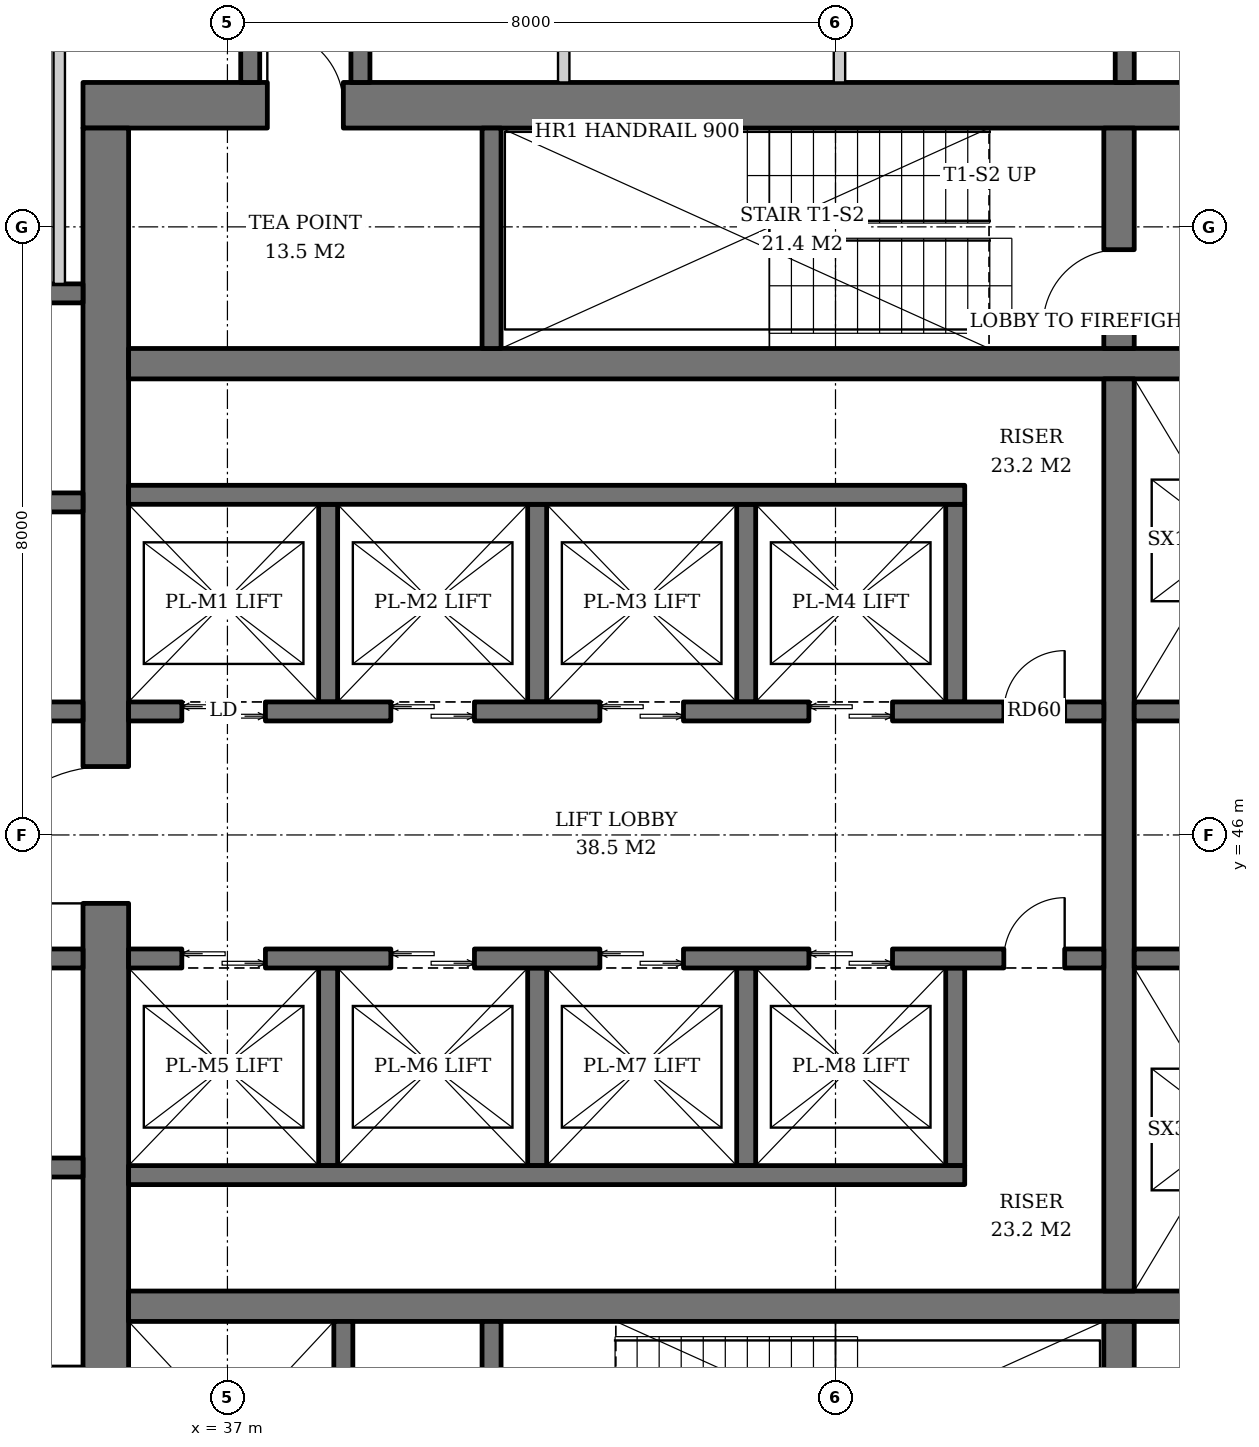
"""IFC4 building model, lengths in metres.
Left out: names, types, materials, properties, quantities, classifications, styles, units other than length and angle.
Written with IfcOpenShell. Run it as: python <this file> out.ifc"""

import sys

from ifc_helpers import new_model, si_unit, direction, frame, frame_2d, origin, place, context, subcontext, project, spatial, rectangle, extrude, element, fill, save


model = new_model("IFC4")
c1 = context("Model", 3, precision=1e-05, world=origin(), true_north=direction((0.0, 1.0)))
c2 = subcontext(c1, "Body", "Model", "MODEL_VIEW")
j1 = project(units=[si_unit("LENGTHUNIT", "METRE"), si_unit("PLANEANGLEUNIT", "RADIAN")], contexts=[c1])
p1 = place(None, origin())
s1 = spatial("IfcSite", under=j1, at=p1, CompositionType="ELEMENT")
p2 = place(p1, origin())
s2 = spatial("IfcBuilding", under=s1, at=p2, CompositionType="ELEMENT")
p3 = place(p2, frame((0.0, 0.0, 154.0)))
s3 = spatial("IfcBuildingStorey", under=s2, at=p3, CompositionType="ELEMENT", Elevation=154.0)
p4 = place(p3, frame((35.1, 55.6, 0.0), z_axis=(0.0, 0.0, 1.0), x_axis=(1.0, 0.0, 0.0)))
e1 = element("IfcWall", 1, at=p4, inside=s3, PredefinedType="SHEAR", context=c2, shape_type="SweptSolid", body=[
    extrude(rectangle(XDim=19.8, YDim=0.6, at=frame_2d((9.9, 0.0))), origin(), (0.0, 0.0, 1.0), 3.8),
])
p5 = place(p4, frame((14.54, 0.0, 0.0)))
e2 = element("IfcOpeningElement", 2, at=p5, cuts=e1, PredefinedType="OPENING", context=c2, shape_type="SweptSolid", body=[
    extrude(rectangle(XDim=1.0, YDim=2.1, at=frame_2d((0.5, 1.05))), frame((0.0, 0.31, 0.0), z_axis=(0.0, -1.0, 0.0), x_axis=(1.0, 0.0, 0.0)), (0.0, 0.0, 1.0), 0.62),
])
p6 = place(p4, frame((2.425, 0.0, 0.0)))
e3 = element("IfcOpeningElement", 3, at=p6, cuts=e1, PredefinedType="OPENING", context=c2, shape_type="SweptSolid", body=[
    extrude(rectangle(XDim=1.0, YDim=2.1, at=frame_2d((0.5, 1.05))), frame((0.0, 0.31, 0.0), z_axis=(0.0, -1.0, 0.0), x_axis=(1.0, 0.0, 0.0)), (0.0, 0.0, 1.0), 0.62),
])
p7 = place(p3, frame((35.4, 36.7, 0.0), z_axis=(0.0, 0.0, 1.0), x_axis=(0.0, 1.0, 0.0)))
e4 = element("IfcWall", 4, at=p7, inside=s3, PredefinedType="SHEAR", context=c2, shape_type="SweptSolid", body=[
    extrude(rectangle(XDim=18.6, YDim=0.6, at=frame_2d((9.3, 0.0))), origin(), (0.0, 0.0, 1.0), 3.8),
])
p8 = place(p7, frame((8.4, 0.0, 0.0)))
e5 = element("IfcOpeningElement", 5, at=p8, cuts=e4, PredefinedType="OPENING", context=c2, shape_type="SweptSolid", body=[
    extrude(rectangle(XDim=1.8, YDim=2.4, at=frame_2d((0.9, 1.2))), frame((0.0, 0.31, 0.0), z_axis=(0.0, -1.0, 0.0), x_axis=(1.0, 0.0, 0.0)), (0.0, 0.0, 1.0), 0.62),
])
for number, where, z_axis, x_axis in (
    (6, (35.7, 39.8, 0.0), (0.0, 0.0, 1.0), (1.0, 0.0, 0.0)),
    (7, (35.7, 52.2, 0.0), (0.0, 0.0, 1.0), (1.0, 0.0, 0.0)),
):
    element("IfcWall", number, at=place(p3, frame(where, z_axis=z_axis, x_axis=x_axis)), inside=s3, PredefinedType="SHEAR", context=c2, shape_type="SweptSolid", body=[
        extrude(rectangle(XDim=18.6, YDim=0.4, at=frame_2d((9.3, 0.0))), origin(), (0.0, 0.0, 1.0), 3.8),
    ])
p9 = place(p3, frame((48.73, 36.7, 0.0), z_axis=(0.0, 0.0, 1.0), x_axis=(0.0, 1.0, 0.0)))
e8 = element("IfcWall", 8, at=p9, inside=s3, PredefinedType="SHEAR", context=c2, shape_type="SweptSolid", body=[
    extrude(rectangle(XDim=2.9, YDim=0.4, at=frame_2d((1.45, 0.0))), origin(), (0.0, 0.0, 1.0), 3.8),
])
p10 = place(p3, frame((48.73, 40.0, 0.0), z_axis=(0.0, 0.0, 1.0), x_axis=(0.0, 1.0, 0.0)))
e9 = element("IfcWall", 9, at=p10, inside=s3, PredefinedType="SHEAR", context=c2, shape_type="SweptSolid", body=[
    extrude(rectangle(XDim=12.0, YDim=0.4, at=frame_2d((6.0, 0.0))), origin(), (0.0, 0.0, 1.0), 3.8),
])
p11 = place(p3, frame((48.73, 52.4, 0.0), z_axis=(0.0, 0.0, 1.0), x_axis=(0.0, 1.0, 0.0)))
e10 = element("IfcWall", 10, at=p11, inside=s3, PredefinedType="SHEAR", context=c2, shape_type="SweptSolid", body=[
    extrude(rectangle(XDim=2.9, YDim=0.4, at=frame_2d((1.45, 0.0))), origin(), (0.0, 0.0, 1.0), 3.8),
])
p12 = place(p11, frame((0.3, 0.0, 0.0)))
e11 = element("IfcOpeningElement", 11, at=p12, cuts=e10, PredefinedType="OPENING", context=c2, shape_type="SweptSolid", body=[
    extrude(rectangle(XDim=1.0, YDim=2.1, at=frame_2d((0.5, 1.05))), frame((0.0, 0.21, 0.0), z_axis=(0.0, -1.0, 0.0), x_axis=(1.0, 0.0, 0.0)), (0.0, 0.0, 1.0), 0.42),
])
p13 = place(p3, frame((38.525, 36.7, 0.0), z_axis=(0.0, 0.0, 1.0), x_axis=(0.0, 1.0, 0.0)))
e12 = element("IfcWall", 12, at=p13, inside=s3, PredefinedType="SHEAR", context=c2, shape_type="SweptSolid", body=[
    extrude(rectangle(XDim=2.9, YDim=0.25, at=frame_2d((1.45, 0.0))), origin(), (0.0, 0.0, 1.0), 3.8),
])
p14 = place(p13, frame((0.8, 0.0, 0.0)))
e13 = element("IfcOpeningElement", 13, at=p14, cuts=e12, PredefinedType="OPENING", context=c2, shape_type="SweptSolid", body=[
    extrude(rectangle(XDim=1.3, YDim=2.2, at=frame_2d((0.65, 1.1))), frame((0.0, 0.135, 0.0), z_axis=(0.0, -1.0, 0.0), x_axis=(1.0, 0.0, 0.0)), (0.0, 0.0, 1.0), 0.27),
])
p15 = place(p3, frame((40.475, 36.7, 0.0), z_axis=(0.0, 0.0, 1.0), x_axis=(0.0, 1.0, 0.0)))
e14 = element("IfcWall", 14, at=p15, inside=s3, PredefinedType="SHEAR", context=c2, shape_type="SweptSolid", body=[
    extrude(rectangle(XDim=2.9, YDim=0.25, at=frame_2d((1.45, 0.0))), origin(), (0.0, 0.0, 1.0), 3.8),
])
p16 = place(p15, frame((0.75, 0.0, 0.0)))
e15 = element("IfcOpeningElement", 15, at=p16, cuts=e14, PredefinedType="OPENING", context=c2, shape_type="SweptSolid", body=[
    extrude(rectangle(XDim=1.2, YDim=2.1, at=frame_2d((0.6, 1.05))), frame((0.0, 0.135, 0.0), z_axis=(0.0, -1.0, 0.0), x_axis=(1.0, 0.0, 0.0)), (0.0, 0.0, 1.0), 0.27),
])
p17 = place(p3, frame((40.475, 52.4, 0.0), z_axis=(0.0, 0.0, 1.0), x_axis=(0.0, 1.0, 0.0)))
e16 = element("IfcWall", 16, at=p17, inside=s3, PredefinedType="SHEAR", context=c2, shape_type="SweptSolid", body=[
    extrude(rectangle(XDim=2.9, YDim=0.25, at=frame_2d((1.45, 0.0))), origin(), (0.0, 0.0, 1.0), 3.8),
])
for number, where, z_axis, x_axis in (
    (17, (38.325, 47.75, 0.0), (0.0, 0.0, 1.0), (0.0, 1.0, 0.0)),
    (18, (41.075, 47.75, 0.0), (0.0, 0.0, 1.0), (0.0, 1.0, 0.0)),
    (19, (43.825, 47.75, 0.0), (0.0, 0.0, 1.0), (0.0, 1.0, 0.0)),
    (20, (46.575, 47.75, 0.0), (0.0, 0.0, 1.0), (0.0, 1.0, 0.0)),
):
    element("IfcWall", number, at=place(p3, frame(where, z_axis=z_axis, x_axis=x_axis)), inside=s3, PredefinedType="SHEAR", context=c2, shape_type="SweptSolid", body=[
        extrude(rectangle(XDim=2.6, YDim=0.25, at=frame_2d((1.3, 0.0))), origin(), (0.0, 0.0, 1.0), 3.8),
    ])
p18 = place(p3, frame((35.7, 50.475, 0.0), z_axis=(0.0, 0.0, 1.0), x_axis=(1.0, 0.0, 0.0)))
e21 = element("IfcWall", 21, at=p18, inside=s3, PredefinedType="SHEAR", context=c2, shape_type="SweptSolid", body=[
    extrude(rectangle(XDim=11.0, YDim=0.25, at=frame_2d((5.5, 0.0))), origin(), (0.0, 0.0, 1.0), 3.8),
])
p19 = place(p3, frame((35.7, 47.625, 0.0), z_axis=(0.0, 0.0, 1.0), x_axis=(1.0, 0.0, 0.0)))
e22 = element("IfcWall", 22, at=p19, inside=s3, PredefinedType="SHEAR", context=c2, shape_type="SweptSolid", body=[
    extrude(rectangle(XDim=12.83, YDim=0.25, at=frame_2d((6.415, 0.0))), origin(), (0.0, 0.0, 1.0), 3.8),
])
p20 = place(p19, frame((0.7, 0.0, 0.0)))
e23 = element("IfcOpeningElement", 23, at=p20, cuts=e22, PredefinedType="OPENING", context=c2, shape_type="SweptSolid", body=[
    extrude(rectangle(XDim=1.1, YDim=2.2, at=frame_2d((0.55, 1.1))), frame((0.0, 0.135, 0.0), z_axis=(0.0, -1.0, 0.0), x_axis=(1.0, 0.0, 0.0)), (0.0, 0.0, 1.0), 0.27),
])
p21 = place(p19, frame((3.45, 0.0, 0.0)))
e24 = element("IfcOpeningElement", 24, at=p21, cuts=e22, PredefinedType="OPENING", context=c2, shape_type="SweptSolid", body=[
    extrude(rectangle(XDim=1.1, YDim=2.2, at=frame_2d((0.55, 1.1))), frame((0.0, 0.135, 0.0), z_axis=(0.0, -1.0, 0.0), x_axis=(1.0, 0.0, 0.0)), (0.0, 0.0, 1.0), 0.27),
])
p22 = place(p19, frame((6.2, 0.0, 0.0)))
e25 = element("IfcOpeningElement", 25, at=p22, cuts=e22, PredefinedType="OPENING", context=c2, shape_type="SweptSolid", body=[
    extrude(rectangle(XDim=1.1, YDim=2.2, at=frame_2d((0.55, 1.1))), frame((0.0, 0.135, 0.0), z_axis=(0.0, -1.0, 0.0), x_axis=(1.0, 0.0, 0.0)), (0.0, 0.0, 1.0), 0.27),
])
p23 = place(p19, frame((8.95, 0.0, 0.0)))
e26 = element("IfcOpeningElement", 26, at=p23, cuts=e22, PredefinedType="OPENING", context=c2, shape_type="SweptSolid", body=[
    extrude(rectangle(XDim=1.1, YDim=2.2, at=frame_2d((0.55, 1.1))), frame((0.0, 0.135, 0.0), z_axis=(0.0, -1.0, 0.0), x_axis=(1.0, 0.0, 0.0)), (0.0, 0.0, 1.0), 0.27),
])
p24 = place(p19, frame((11.515, 0.0, 0.0)))
e27 = element("IfcOpeningElement", 27, at=p24, cuts=e22, PredefinedType="OPENING", context=c2, shape_type="SweptSolid", body=[
    extrude(rectangle(XDim=0.8, YDim=2.0, at=frame_2d((0.4, 1.0))), frame((0.0, 0.135, 0.0), z_axis=(0.0, -1.0, 0.0), x_axis=(1.0, 0.0, 0.0)), (0.0, 0.0, 1.0), 0.27),
])
for number, where, z_axis, x_axis in (
    (28, (38.325, 44.25, 0.0), (0.0, 0.0, 1.0), (0.0, -1.0, 0.0)),
    (29, (41.075, 44.25, 0.0), (0.0, 0.0, 1.0), (0.0, -1.0, 0.0)),
    (30, (43.825, 44.25, 0.0), (0.0, 0.0, 1.0), (0.0, -1.0, 0.0)),
    (31, (46.575, 44.25, 0.0), (0.0, 0.0, 1.0), (0.0, -1.0, 0.0)),
):
    element("IfcWall", number, at=place(p3, frame(where, z_axis=z_axis, x_axis=x_axis)), inside=s3, PredefinedType="SHEAR", context=c2, shape_type="SweptSolid", body=[
        extrude(rectangle(XDim=2.6, YDim=0.25, at=frame_2d((1.3, 0.0))), origin(), (0.0, 0.0, 1.0), 3.8),
    ])
p25 = place(p3, frame((35.7, 41.525, 0.0), z_axis=(0.0, 0.0, 1.0), x_axis=(1.0, 0.0, 0.0)))
e32 = element("IfcWall", 32, at=p25, inside=s3, PredefinedType="SHEAR", context=c2, shape_type="SweptSolid", body=[
    extrude(rectangle(XDim=11.0, YDim=0.25, at=frame_2d((5.5, 0.0))), origin(), (0.0, 0.0, 1.0), 3.8),
])
p26 = place(p3, frame((35.7, 44.375, 0.0), z_axis=(0.0, 0.0, 1.0), x_axis=(1.0, 0.0, 0.0)))
e33 = element("IfcWall", 33, at=p26, inside=s3, PredefinedType="SHEAR", context=c2, shape_type="SweptSolid", body=[
    extrude(rectangle(XDim=12.83, YDim=0.25, at=frame_2d((6.415, 0.0))), origin(), (0.0, 0.0, 1.0), 3.8),
])
p27 = place(p26, frame((0.7, 0.0, 0.0)))
e34 = element("IfcOpeningElement", 34, at=p27, cuts=e33, PredefinedType="OPENING", context=c2, shape_type="SweptSolid", body=[
    extrude(rectangle(XDim=1.1, YDim=2.2, at=frame_2d((0.55, 1.1))), frame((0.0, 0.135, 0.0), z_axis=(0.0, -1.0, 0.0), x_axis=(1.0, 0.0, 0.0)), (0.0, 0.0, 1.0), 0.27),
])
p28 = place(p26, frame((3.45, 0.0, 0.0)))
e35 = element("IfcOpeningElement", 35, at=p28, cuts=e33, PredefinedType="OPENING", context=c2, shape_type="SweptSolid", body=[
    extrude(rectangle(XDim=1.1, YDim=2.2, at=frame_2d((0.55, 1.1))), frame((0.0, 0.135, 0.0), z_axis=(0.0, -1.0, 0.0), x_axis=(1.0, 0.0, 0.0)), (0.0, 0.0, 1.0), 0.27),
])
p29 = place(p26, frame((6.2, 0.0, 0.0)))
e36 = element("IfcOpeningElement", 36, at=p29, cuts=e33, PredefinedType="OPENING", context=c2, shape_type="SweptSolid", body=[
    extrude(rectangle(XDim=1.1, YDim=2.2, at=frame_2d((0.55, 1.1))), frame((0.0, 0.135, 0.0), z_axis=(0.0, -1.0, 0.0), x_axis=(1.0, 0.0, 0.0)), (0.0, 0.0, 1.0), 0.27),
])
p30 = place(p26, frame((8.95, 0.0, 0.0)))
e37 = element("IfcOpeningElement", 37, at=p30, cuts=e33, PredefinedType="OPENING", context=c2, shape_type="SweptSolid", body=[
    extrude(rectangle(XDim=1.1, YDim=2.2, at=frame_2d((0.55, 1.1))), frame((0.0, 0.135, 0.0), z_axis=(0.0, -1.0, 0.0), x_axis=(1.0, 0.0, 0.0)), (0.0, 0.0, 1.0), 0.27),
])
p31 = place(p26, frame((11.515, 0.0, 0.0)))
e38 = element("IfcOpeningElement", 38, at=p31, cuts=e33, PredefinedType="OPENING", context=c2, shape_type="SweptSolid", body=[
    extrude(rectangle(XDim=0.8, YDim=2.0, at=frame_2d((0.4, 1.0))), frame((0.0, 0.135, 0.0), z_axis=(0.0, -1.0, 0.0), x_axis=(1.0, 0.0, 0.0)), (0.0, 0.0, 1.0), 0.27),
])
for number, where, z_axis, x_axis in (
    (39, (48.93, 47.625, 0.0), (0.0, 0.0, 1.0), (1.0, 0.0, 0.0)),
    (40, (48.93, 44.375, 0.0), (0.0, 0.0, 1.0), (1.0, 0.0, 0.0)),
):
    element("IfcWall", number, at=place(p3, frame(where, z_axis=z_axis, x_axis=x_axis)), inside=s3, PredefinedType="SHEAR", context=c2, shape_type="SweptSolid", body=[
        extrude(rectangle(XDim=5.37, YDim=0.25, at=frame_2d((2.685, 0.0))), origin(), (0.0, 0.0, 1.0), 3.8),
    ])
for number, where, z_axis, x_axis in (
    (41, (32.4, 41.625, 0.0), (0.0, 0.0, 1.0), (1.0, 0.0, 0.0)),
    (42, (32.4, 44.375, 0.0), (0.0, 0.0, 1.0), (1.0, 0.0, 0.0)),
    (43, (32.4, 47.625, 0.0), (0.0, 0.0, 1.0), (1.0, 0.0, 0.0)),
    (44, (32.4, 50.375, 0.0), (0.0, 0.0, 1.0), (1.0, 0.0, 0.0)),
    (45, (32.4, 53.125, 0.0), (0.0, 0.0, 1.0), (1.0, 0.0, 0.0)),
):
    element("IfcWall", number, at=place(p3, frame(where, z_axis=z_axis, x_axis=x_axis)), inside=s3, PredefinedType="SHEAR", context=c2, shape_type="SweptSolid", body=[
        extrude(rectangle(XDim=2.7, YDim=0.25, at=frame_2d((1.35, 0.0))), origin(), (0.0, 0.0, 1.0), 3.8),
    ])
for number, where, z_axis, x_axis in (
    (46, (48.805, 55.9, 0.0), (0.0, 0.0, 1.0), (0.0, 1.0, 0.0)),
    (47, (37.3, 55.9, 0.0), (0.0, 0.0, 1.0), (0.0, 1.0, 0.0)),
    (48, (38.75, 55.9, 0.0), (0.0, 0.0, 1.0), (0.0, 1.0, 0.0)),
):
    element("IfcWall", number, at=place(p3, frame(where, z_axis=z_axis, x_axis=x_axis)), inside=s3, PredefinedType="SOLIDWALL", context=c2, shape_type="SweptSolid", body=[
        extrude(rectangle(XDim=2.7, YDim=0.25, at=frame_2d((1.35, 0.0))), origin(), (0.0, 0.0, 1.0), 3.52),
    ])
p32 = place(p3, frame((34.788, 53.25, 0.0), z_axis=(0.0, 0.0, 1.0), x_axis=(0.0, 1.0, 0.0)))
e49 = element("IfcWall", 49, at=p32, inside=s3, PredefinedType="SOLIDWALL", context=c2, shape_type="SweptSolid", body=[
    extrude(rectangle(XDim=5.35, YDim=0.15, at=frame_2d((2.675, 0.0))), origin(), (0.0, 0.0, 1.0), 3.52),
])
for number, where, z_axis, x_axis in (
    (50, (41.424, 55.9, 0.0), (0.0, 0.0, 1.0), (0.0, 1.0, 0.0)),
    (51, (45.052, 55.9, 0.0), (0.0, 0.0, 1.0), (0.0, 1.0, 0.0)),
):
    element("IfcWall", number, at=place(p3, frame(where, z_axis=z_axis, x_axis=x_axis)), inside=s3, PredefinedType="SOLIDWALL", context=c2, shape_type="SweptSolid", body=[
        extrude(rectangle(XDim=2.7, YDim=0.15, at=frame_2d((1.35, 0.0))), origin(), (0.0, 0.0, 1.0), 3.52),
    ])
p33 = place(p20, origin())
e52 = element("IfcDoor", 52, at=p33, inside=s3, OperationType="DOUBLE_DOOR_SLIDING", PredefinedType="DOOR", context=c2, shape_type="SweptSolid", body=[
    extrude(rectangle(XDim=1.1, YDim=2.2, at=frame_2d((0.55, 1.1))), frame((0.0, 0.025, 0.0), z_axis=(0.0, -1.0, 0.0), x_axis=(1.0, 0.0, 0.0)), (0.0, 0.0, 1.0), 0.05),
])
fill(e23, e52)
p34 = place(p21, origin())
e53 = element("IfcDoor", 53, at=p34, inside=s3, OperationType="DOUBLE_DOOR_SLIDING", PredefinedType="DOOR", context=c2, shape_type="SweptSolid", body=[
    extrude(rectangle(XDim=1.1, YDim=2.2, at=frame_2d((0.55, 1.1))), frame((0.0, 0.025, 0.0), z_axis=(0.0, -1.0, 0.0), x_axis=(1.0, 0.0, 0.0)), (0.0, 0.0, 1.0), 0.05),
])
fill(e24, e53)
p35 = place(p22, origin())
e54 = element("IfcDoor", 54, at=p35, inside=s3, OperationType="DOUBLE_DOOR_SLIDING", PredefinedType="DOOR", context=c2, shape_type="SweptSolid", body=[
    extrude(rectangle(XDim=1.1, YDim=2.2, at=frame_2d((0.55, 1.1))), frame((0.0, 0.025, 0.0), z_axis=(0.0, -1.0, 0.0), x_axis=(1.0, 0.0, 0.0)), (0.0, 0.0, 1.0), 0.05),
])
fill(e25, e54)
p36 = place(p23, origin())
e55 = element("IfcDoor", 55, at=p36, inside=s3, OperationType="DOUBLE_DOOR_SLIDING", PredefinedType="DOOR", context=c2, shape_type="SweptSolid", body=[
    extrude(rectangle(XDim=1.1, YDim=2.2, at=frame_2d((0.55, 1.1))), frame((0.0, 0.025, 0.0), z_axis=(0.0, -1.0, 0.0), x_axis=(1.0, 0.0, 0.0)), (0.0, 0.0, 1.0), 0.05),
])
fill(e26, e55)
p37 = place(p24, origin())
e56 = element("IfcDoor", 56, at=p37, inside=s3, OperationType="SINGLE_SWING_RIGHT", PredefinedType="DOOR", context=c2, shape_type="SweptSolid", body=[
    extrude(rectangle(XDim=0.8, YDim=2.0, at=frame_2d((0.4, 1.0))), frame((0.0, 0.025, 0.0), z_axis=(0.0, -1.0, 0.0), x_axis=(1.0, 0.0, 0.0)), (0.0, 0.0, 1.0), 0.05),
])
fill(e27, e56)
p38 = place(p27, origin())
e57 = element("IfcDoor", 57, at=p38, inside=s3, OperationType="DOUBLE_DOOR_SLIDING", PredefinedType="DOOR", context=c2, shape_type="SweptSolid", body=[
    extrude(rectangle(XDim=1.1, YDim=2.2, at=frame_2d((0.55, 1.1))), frame((0.0, 0.025, 0.0), z_axis=(0.0, -1.0, 0.0), x_axis=(1.0, 0.0, 0.0)), (0.0, 0.0, 1.0), 0.05),
])
fill(e34, e57)
p39 = place(p28, origin())
e58 = element("IfcDoor", 58, at=p39, inside=s3, OperationType="DOUBLE_DOOR_SLIDING", PredefinedType="DOOR", context=c2, shape_type="SweptSolid", body=[
    extrude(rectangle(XDim=1.1, YDim=2.2, at=frame_2d((0.55, 1.1))), frame((0.0, 0.025, 0.0), z_axis=(0.0, -1.0, 0.0), x_axis=(1.0, 0.0, 0.0)), (0.0, 0.0, 1.0), 0.05),
])
fill(e35, e58)
p40 = place(p29, origin())
e59 = element("IfcDoor", 59, at=p40, inside=s3, OperationType="DOUBLE_DOOR_SLIDING", PredefinedType="DOOR", context=c2, shape_type="SweptSolid", body=[
    extrude(rectangle(XDim=1.1, YDim=2.2, at=frame_2d((0.55, 1.1))), frame((0.0, 0.025, 0.0), z_axis=(0.0, -1.0, 0.0), x_axis=(1.0, 0.0, 0.0)), (0.0, 0.0, 1.0), 0.05),
])
fill(e36, e59)
p41 = place(p30, origin())
e60 = element("IfcDoor", 60, at=p41, inside=s3, OperationType="DOUBLE_DOOR_SLIDING", PredefinedType="DOOR", context=c2, shape_type="SweptSolid", body=[
    extrude(rectangle(XDim=1.1, YDim=2.2, at=frame_2d((0.55, 1.1))), frame((0.0, 0.025, 0.0), z_axis=(0.0, -1.0, 0.0), x_axis=(1.0, 0.0, 0.0)), (0.0, 0.0, 1.0), 0.05),
])
fill(e37, e60)
p42 = place(p31, origin())
e61 = element("IfcDoor", 61, at=p42, inside=s3, OperationType="SINGLE_SWING_RIGHT", PredefinedType="DOOR", context=c2, shape_type="SweptSolid", body=[
    extrude(rectangle(XDim=0.8, YDim=2.0, at=frame_2d((0.4, 1.0))), frame((0.0, 0.025, 0.0), z_axis=(0.0, -1.0, 0.0), x_axis=(1.0, 0.0, 0.0)), (0.0, 0.0, 1.0), 0.05),
])
fill(e38, e61)
p43 = place(p12, origin())
e62 = element("IfcDoor", 62, at=p43, inside=s3, OperationType="SINGLE_SWING_LEFT", PredefinedType="DOOR", context=c2, shape_type="SweptSolid", body=[
    extrude(rectangle(XDim=1.0, YDim=2.1, at=frame_2d((0.5, 1.05))), frame((0.0, 0.025, 0.0), z_axis=(0.0, -1.0, 0.0), x_axis=(1.0, 0.0, 0.0)), (0.0, 0.0, 1.0), 0.05),
])
fill(e11, e62)
p44 = place(p8, origin())
e63 = element("IfcDoor", 63, at=p44, inside=s3, OperationType="DOUBLE_DOOR_SINGLE_SWING", PredefinedType="DOOR", context=c2, shape_type="SweptSolid", body=[
    extrude(rectangle(XDim=1.8, YDim=2.4, at=frame_2d((0.9, 1.2))), frame((0.0, 0.025, 0.0), z_axis=(0.0, -1.0, 0.0), x_axis=(1.0, 0.0, 0.0)), (0.0, 0.0, 1.0), 0.05),
])
fill(e5, e63)
p45 = place(p6, origin())
e64 = element("IfcDoor", 64, at=p45, inside=s3, OperationType="SINGLE_SWING_LEFT", PredefinedType="DOOR", context=c2, shape_type="SweptSolid", body=[
    extrude(rectangle(XDim=1.0, YDim=2.1, at=frame_2d((0.5, 1.05))), frame((0.0, -0.24, 0.0), z_axis=(0.0, -1.0, 0.0), x_axis=(1.0, 0.0, 0.0)), (0.0, 0.0, 1.0), 0.05),
])
fill(e3, e64)
save(model, sys.argv[1])
